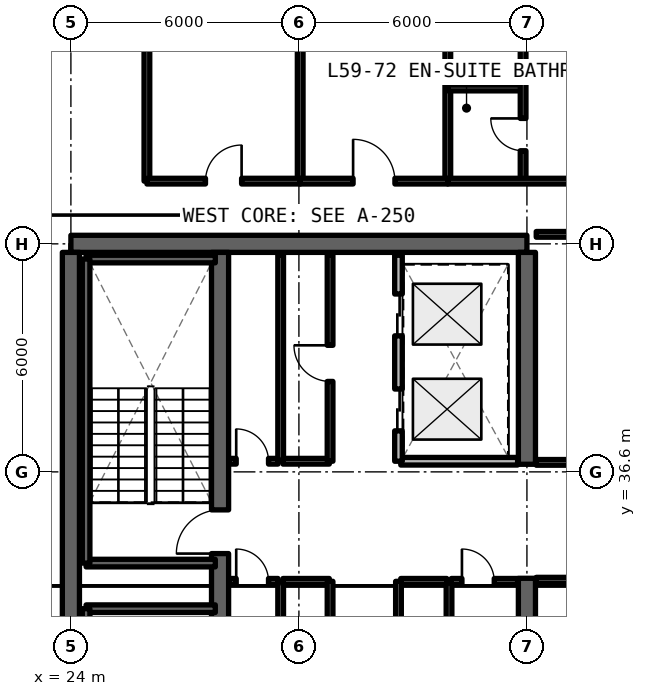
"""IFC4 building model, lengths in metres.
Left out: names, types, materials, properties, quantities, classifications, styles, units other than length and angle.
Written with IfcOpenShell. Run it as: python <this file> out.ifc"""

import sys

from ifc_helpers import new_model, si_unit, direction, frame, frame_2d, origin, place, context, subcontext, project, spatial, rectangle, extrude, element, fill, save


model = new_model("IFC4")
c1 = context("Model", 3, precision=1e-05, world=origin(), true_north=direction((0.0, 1.0)))
c2 = subcontext(c1, "Body", "Model", "MODEL_VIEW")
j1 = project(units=[si_unit("LENGTHUNIT", "METRE"), si_unit("PLANEANGLEUNIT", "RADIAN")], contexts=[c1])
p1 = place(None, origin())
s1 = spatial("IfcSite", under=j1, at=p1, CompositionType="ELEMENT")
p2 = place(p1, origin())
s2 = spatial("IfcBuilding", under=s1, at=p2, CompositionType="ELEMENT")
p3 = place(p2, frame((0.0, 0.0, 211.86)))
s3 = spatial("IfcBuildingStorey", under=s2, at=p3, CompositionType="ELEMENT", Elevation=211.86)
p4 = place(p3, frame((36.0, 42.6, 0.0), z_axis=(0.0, 0.0, 1.0), x_axis=(-1.0, 0.0, 0.0)))
e1 = element("IfcWall", 1, at=p4, inside=s3, PredefinedType="SHEAR", context=c2, shape_type="SweptSolid", body=[
    extrude(rectangle(XDim=12.0, YDim=0.45, at=frame_2d((6.0, 0.0))), origin(), (0.0, 0.0, 1.0), 3.63),
])
p5 = place(p3, frame((24.0, 24.825, 0.0), z_axis=(0.0, 0.0, 1.0), x_axis=(0.0, 1.0, 0.0)))
e2 = element("IfcWall", 2, at=p5, inside=s3, PredefinedType="SHEAR", context=c2, shape_type="SweptSolid", body=[
    extrude(rectangle(XDim=17.55, YDim=0.45, at=frame_2d((8.775, 0.0))), origin(), (0.0, 0.0, 1.0), 3.63),
])
p6 = place(p3, frame((36.0, 24.825, 0.0), z_axis=(0.0, 0.0, 1.0), x_axis=(0.0, 1.0, 0.0)))
e3 = element("IfcWall", 3, at=p6, inside=s3, PredefinedType="SHEAR", context=c2, shape_type="SweptSolid", body=[
    extrude(rectangle(XDim=8.975, YDim=0.45, at=frame_2d((4.488, 0.0))), origin(), (0.0, 0.0, 1.0), 3.63),
])
p7 = place(p3, frame((36.0, 36.8, 0.0), z_axis=(0.0, 0.0, 1.0), x_axis=(0.0, 1.0, 0.0)))
e4 = element("IfcWall", 4, at=p7, inside=s3, PredefinedType="SHEAR", context=c2, shape_type="SweptSolid", body=[
    extrude(rectangle(XDim=5.575, YDim=0.45, at=frame_2d((2.788, 0.0))), origin(), (0.0, 0.0, 1.0), 3.63),
])
p8 = place(p3, frame((27.925, 24.825, 0.0), z_axis=(0.0, 0.0, 1.0), x_axis=(0.0, 1.0, 0.0)))
e5 = element("IfcWall", 5, at=p8, inside=s3, PredefinedType="SHEAR", context=c2, shape_type="SweptSolid", body=[
    extrude(rectangle(XDim=17.55, YDim=0.45, at=frame_2d((8.775, 0.0))), origin(), (0.0, 0.0, 1.0), 3.63),
])
p9 = place(p8, frame((0.425, 0.0, 0.0)))
e6 = element("IfcOpeningElement", 6, at=p9, cuts=e5, PredefinedType="OPENING", context=c2, shape_type="SweptSolid", body=[
    extrude(rectangle(XDim=1.15, YDim=2.15, at=frame_2d((0.575, 1.075))), frame((0.0, 0.235, 0.0), z_axis=(0.0, -1.0, 0.0), x_axis=(1.0, 0.0, 0.0)), (0.0, 0.0, 1.0), 0.47),
])
p10 = place(p8, frame((9.625, 0.0, 0.0)))
e7 = element("IfcOpeningElement", 7, at=p10, cuts=e5, PredefinedType="OPENING", context=c2, shape_type="SweptSolid", body=[
    extrude(rectangle(XDim=1.15, YDim=2.15, at=frame_2d((0.575, 1.075))), frame((0.0, 0.235, 0.0), z_axis=(0.0, -1.0, 0.0), x_axis=(1.0, 0.0, 0.0)), (0.0, 0.0, 1.0), 0.47),
])
p11 = place(p3, frame((29.52, 28.5, 0.0), z_axis=(0.0, 0.0, 1.0), x_axis=(0.0, 1.0, 0.0)))
e8 = element("IfcWall", 8, at=p11, inside=s3, PredefinedType="SOLIDWALL", context=c2, shape_type="SweptSolid", body=[
    extrude(rectangle(XDim=5.22, YDim=0.15, at=frame_2d((2.61, 0.0))), origin(), (0.0, 0.0, 1.0), 2.63),
])
p12 = place(p3, frame((28.17, 33.72, 0.0), z_axis=(0.0, 0.0, 1.0), x_axis=(1.0, 0.0, 0.0)))
e9 = element("IfcWall", 9, at=p12, inside=s3, PredefinedType="SOLIDWALL", context=c2, shape_type="SweptSolid", body=[
    extrude(rectangle(XDim=1.28, YDim=0.15, at=frame_2d((0.64, 0.0))), origin(), (0.0, 0.0, 1.0), 2.63),
])
p13 = place(p12, frame((0.18, 0.0, 0.0)))
e10 = element("IfcOpeningElement", 10, at=p13, cuts=e9, PredefinedType="OPENING", context=c2, shape_type="SweptSolid", body=[
    extrude(rectangle(XDim=0.85, YDim=2.1, at=frame_2d((0.425, 1.05))), frame((0.0, 0.085, 0.0), z_axis=(0.0, -1.0, 0.0), x_axis=(1.0, 0.0, 0.0)), (0.0, 0.0, 1.0), 0.17),
])
p14 = place(p3, frame((29.58, 33.72, 0.0), z_axis=(0.0, 0.0, 1.0), x_axis=(1.0, 0.0, 0.0)))
e11 = element("IfcWall", 11, at=p14, inside=s3, PredefinedType="SOLIDWALL", context=c2, shape_type="SweptSolid", body=[
    extrude(rectangle(XDim=1.22, YDim=0.15, at=frame_2d((0.61, 0.0))), origin(), (0.0, 0.0, 1.0), 2.63),
])
p15 = place(p3, frame((30.82, 28.5, 0.0), z_axis=(0.0, 0.0, 1.0), x_axis=(0.0, 1.0, 0.0)))
e12 = element("IfcWall", 12, at=p15, inside=s3, PredefinedType="SOLIDWALL", context=c2, shape_type="SweptSolid", body=[
    extrude(rectangle(XDim=5.22, YDim=0.15, at=frame_2d((2.61, 0.0))), origin(), (0.0, 0.0, 1.0), 2.63),
])
p16 = place(p15, frame((2.0, 0.0, 0.0)))
e13 = element("IfcOpeningElement", 13, at=p16, cuts=e12, PredefinedType="OPENING", context=c2, shape_type="SweptSolid", body=[
    extrude(rectangle(XDim=0.95, YDim=2.15, at=frame_2d((0.475, 1.075))), frame((0.0, 0.085, 0.0), z_axis=(0.0, -1.0, 0.0), x_axis=(1.0, 0.0, 0.0)), (0.0, 0.0, 1.0), 0.17),
])
p17 = place(p3, frame((33.95, 28.5, 0.0), z_axis=(0.0, 0.0, 1.0), x_axis=(0.0, 1.0, 0.0)))
e14 = element("IfcWall", 14, at=p17, inside=s3, PredefinedType="SOLIDWALL", context=c2, shape_type="SweptSolid", body=[
    extrude(rectangle(XDim=5.22, YDim=0.15, at=frame_2d((2.61, 0.0))), origin(), (0.0, 0.0, 1.0), 2.63),
])
p18 = place(p3, frame((32.68, 33.72, 0.0), z_axis=(0.0, 0.0, 1.0), x_axis=(1.0, 0.0, 0.0)))
e15 = element("IfcWall", 15, at=p18, inside=s3, PredefinedType="SOLIDWALL", context=c2, shape_type="SweptSolid", body=[
    extrude(rectangle(XDim=1.21, YDim=0.15, at=frame_2d((0.605, 0.0))), origin(), (0.0, 0.0, 1.0), 2.63),
])
p19 = place(p3, frame((34.01, 33.72, 0.0), z_axis=(0.0, 0.0, 1.0), x_axis=(1.0, 0.0, 0.0)))
e16 = element("IfcWall", 16, at=p19, inside=s3, PredefinedType="SOLIDWALL", context=c2, shape_type="SweptSolid", body=[
    extrude(rectangle(XDim=1.745, YDim=0.15, at=frame_2d((0.873, 0.0))), origin(), (0.0, 0.0, 1.0), 2.63),
])
p20 = place(p19, frame((0.28, 0.0, 0.0)))
e17 = element("IfcOpeningElement", 17, at=p20, cuts=e16, PredefinedType="OPENING", context=c2, shape_type="SweptSolid", body=[
    extrude(rectangle(XDim=0.85, YDim=2.1, at=frame_2d((0.425, 1.05))), frame((0.0, 0.085, 0.0), z_axis=(0.0, -1.0, 0.0), x_axis=(1.0, 0.0, 0.0)), (0.0, 0.0, 1.0), 0.17),
])
p21 = place(p3, frame((32.62, 28.5, 0.0), z_axis=(0.0, 0.0, 1.0), x_axis=(0.0, 1.0, 0.0)))
e18 = element("IfcWall", 18, at=p21, inside=s3, PredefinedType="SOLIDWALL", context=c2, shape_type="SweptSolid", body=[
    extrude(rectangle(XDim=5.22, YDim=0.15, at=frame_2d((2.61, 0.0))), origin(), (0.0, 0.0, 1.0), 2.63),
])
p22 = place(p21, frame((2.0, 0.0, 0.0)))
e19 = element("IfcOpeningElement", 19, at=p22, cuts=e18, PredefinedType="OPENING", context=c2, shape_type="SweptSolid", body=[
    extrude(rectangle(XDim=0.95, YDim=2.15, at=frame_2d((0.475, 1.075))), frame((0.0, 0.085, 0.0), z_axis=(0.0, -1.0, 0.0), x_axis=(1.0, 0.0, 0.0)), (0.0, 0.0, 1.0), 0.17),
])
p23 = place(p3, frame((29.52, 36.88, 0.0), z_axis=(0.0, 0.0, 1.0), x_axis=(0.0, 1.0, 0.0)))
e20 = element("IfcWall", 20, at=p23, inside=s3, PredefinedType="SOLIDWALL", context=c2, shape_type="SweptSolid", body=[
    extrude(rectangle(XDim=5.42, YDim=0.15, at=frame_2d((2.71, 0.0))), origin(), (0.0, 0.0, 1.0), 2.63),
])
p24 = place(p3, frame((28.17, 36.88, 0.0), z_axis=(0.0, 0.0, 1.0), x_axis=(1.0, 0.0, 0.0)))
e21 = element("IfcWall", 21, at=p24, inside=s3, PredefinedType="SOLIDWALL", context=c2, shape_type="SweptSolid", body=[
    extrude(rectangle(XDim=1.28, YDim=0.15, at=frame_2d((0.64, 0.0))), origin(), (0.0, 0.0, 1.0), 2.63),
])
p25 = place(p24, frame((0.18, 0.0, 0.0)))
e22 = element("IfcOpeningElement", 22, at=p25, cuts=e21, PredefinedType="OPENING", context=c2, shape_type="SweptSolid", body=[
    extrude(rectangle(XDim=0.85, YDim=2.1, at=frame_2d((0.425, 1.05))), frame((0.0, 0.085, 0.0), z_axis=(0.0, -1.0, 0.0), x_axis=(1.0, 0.0, 0.0)), (0.0, 0.0, 1.0), 0.17),
])
p26 = place(p3, frame((29.58, 36.88, 0.0), z_axis=(0.0, 0.0, 1.0), x_axis=(1.0, 0.0, 0.0)))
e23 = element("IfcWall", 23, at=p26, inside=s3, PredefinedType="SOLIDWALL", context=c2, shape_type="SweptSolid", body=[
    extrude(rectangle(XDim=1.22, YDim=0.15, at=frame_2d((0.61, 0.0))), origin(), (0.0, 0.0, 1.0), 2.63),
])
p27 = place(p3, frame((30.82, 36.88, 0.0), z_axis=(0.0, 0.0, 1.0), x_axis=(0.0, 1.0, 0.0)))
e24 = element("IfcWall", 24, at=p27, inside=s3, PredefinedType="SOLIDWALL", context=c2, shape_type="SweptSolid", body=[
    extrude(rectangle(XDim=5.42, YDim=0.15, at=frame_2d((2.71, 0.0))), origin(), (0.0, 0.0, 1.0), 2.63),
])
p28 = place(p27, frame((2.1, 0.0, 0.0)))
e25 = element("IfcOpeningElement", 25, at=p28, cuts=e24, PredefinedType="OPENING", context=c2, shape_type="SweptSolid", body=[
    extrude(rectangle(XDim=0.95, YDim=2.15, at=frame_2d((0.475, 1.075))), frame((0.0, 0.085, 0.0), z_axis=(0.0, -1.0, 0.0), x_axis=(1.0, 0.0, 0.0)), (0.0, 0.0, 1.0), 0.17),
])
p29 = place(p3, frame((32.68, 36.88, 0.0), z_axis=(0.0, 0.0, 1.0), x_axis=(1.0, 0.0, 0.0)))
e26 = element("IfcWall", 26, at=p29, inside=s3, PredefinedType="SOLIDWALL", context=c2, shape_type="SweptSolid", body=[
    extrude(rectangle(XDim=3.075, YDim=0.2, at=frame_2d((1.538, 0.0))), origin(), (0.0, 0.0, 1.0), 2.63),
])
p30 = place(p3, frame((32.62, 36.88, 0.0), z_axis=(0.0, 0.0, 1.0), x_axis=(0.0, 1.0, 0.0)))
e27 = element("IfcWall", 27, at=p30, inside=s3, PredefinedType="SOLIDWALL", context=c2, shape_type="SweptSolid", body=[
    extrude(rectangle(XDim=5.42, YDim=0.2, at=frame_2d((2.71, 0.0))), origin(), (0.0, 0.0, 1.0), 2.63),
])
p31 = place(p30, frame((0.8, 0.0, 0.0)))
e28 = element("IfcOpeningElement", 28, at=p31, cuts=e27, PredefinedType="OPENING", context=c2, shape_type="SweptSolid", body=[
    extrude(rectangle(XDim=1.1, YDim=2.2, at=frame_2d((0.55, 1.1))), frame((0.0, 0.11, 0.0), z_axis=(0.0, -1.0, 0.0), x_axis=(1.0, 0.0, 0.0)), (0.0, 0.0, 1.0), 0.22),
])
p32 = place(p30, frame((3.3, 0.0, 0.0)))
e29 = element("IfcOpeningElement", 29, at=p32, cuts=e27, PredefinedType="OPENING", context=c2, shape_type="SweptSolid", body=[
    extrude(rectangle(XDim=1.1, YDim=2.2, at=frame_2d((0.55, 1.1))), frame((0.0, 0.11, 0.0), z_axis=(0.0, -1.0, 0.0), x_axis=(1.0, 0.0, 0.0)), (0.0, 0.0, 1.0), 0.22),
])
p33 = place(p3, frame((36.245, 33.75, 0.0), z_axis=(0.0, 0.0, 1.0), x_axis=(1.0, 0.0, 0.0)))
e30 = element("IfcWall", 30, at=p33, inside=s3, PredefinedType="SOLIDWALL", context=c2, shape_type="SweptSolid", body=[
    extrude(rectangle(XDim=7.905, YDim=0.15, at=frame_2d((3.952, 0.0))), origin(), (0.0, 0.0, 1.0), 2.63),
])
p34 = place(p33, frame((3.478, 0.0, 0.0)))
e31 = element("IfcOpeningElement", 31, at=p34, cuts=e30, PredefinedType="OPENING", context=c2, shape_type="SweptSolid", body=[
    extrude(rectangle(XDim=0.95, YDim=2.15, at=frame_2d((0.475, 1.075))), frame((0.0, 0.085, 0.0), z_axis=(0.0, -1.0, 0.0), x_axis=(1.0, 0.0, 0.0)), (0.0, 0.0, 1.0), 0.17),
])
p35 = place(p3, frame((36.245, 36.85, 0.0), z_axis=(0.0, 0.0, 1.0), x_axis=(1.0, 0.0, 0.0)))
e32 = element("IfcWall", 32, at=p35, inside=s3, PredefinedType="SOLIDWALL", context=c2, shape_type="SweptSolid", body=[
    extrude(rectangle(XDim=7.905, YDim=0.15, at=frame_2d((3.952, 0.0))), origin(), (0.0, 0.0, 1.0), 2.63),
])
p36 = place(p35, frame((3.478, 0.0, 0.0)))
e33 = element("IfcOpeningElement", 33, at=p36, cuts=e32, PredefinedType="OPENING", context=c2, shape_type="SweptSolid", body=[
    extrude(rectangle(XDim=0.95, YDim=2.15, at=frame_2d((0.475, 1.075))), frame((0.0, 0.085, 0.0), z_axis=(0.0, -1.0, 0.0), x_axis=(1.0, 0.0, 0.0)), (0.0, 0.0, 1.0), 0.17),
])
p37 = place(p3, frame((36.245, 42.85, 0.0), z_axis=(0.0, 0.0, 1.0), x_axis=(1.0, 0.0, 0.0)))
e34 = element("IfcWall", 34, at=p37, inside=s3, PredefinedType="SOLIDWALL", context=c2, shape_type="SweptSolid", body=[
    extrude(rectangle(XDim=7.905, YDim=0.15, at=frame_2d((3.952, 0.0))), origin(), (0.0, 0.0, 1.0), 2.63),
])
p38 = place(p3, frame((26.0, 44.25, 0.0), z_axis=(0.0, 0.0, 1.0), x_axis=(0.0, 1.0, 0.0)))
e35 = element("IfcWall", 35, at=p38, inside=s3, PredefinedType="SOLIDWALL", context=c2, shape_type="SweptSolid", body=[
    extrude(rectangle(XDim=10.79, YDim=0.15, at=frame_2d((5.395, 0.0))), origin(), (0.0, 0.0, 1.0), 2.63),
])
p39 = place(p3, frame((30.034, 44.25, 0.0), z_axis=(0.0, 0.0, 1.0), x_axis=(0.0, 1.0, 0.0)))
e36 = element("IfcWall", 36, at=p39, inside=s3, PredefinedType="SOLIDWALL", context=c2, shape_type="SweptSolid", body=[
    extrude(rectangle(XDim=8.084, YDim=0.15, at=frame_2d((4.042, 0.0))), origin(), (0.0, 0.0, 1.0), 2.63),
])
p40 = place(p3, frame((26.0, 44.25, 0.0), z_axis=(0.0, 0.0, 1.0), x_axis=(1.0, 0.0, 0.0)))
e37 = element("IfcWall", 37, at=p40, inside=s3, PredefinedType="SOLIDWALL", context=c2, shape_type="SweptSolid", body=[
    extrude(rectangle(XDim=4.034, YDim=0.15, at=frame_2d((2.017, 0.0))), origin(), (0.0, 0.0, 1.0), 2.63),
])
p41 = place(p40, frame((1.542, 0.0, 0.0)))
e38 = element("IfcOpeningElement", 38, at=p41, cuts=e37, PredefinedType="OPENING", context=c2, shape_type="SweptSolid", body=[
    extrude(rectangle(XDim=0.95, YDim=2.15, at=frame_2d((0.475, 1.075))), frame((0.0, 0.085, 0.0), z_axis=(0.0, -1.0, 0.0), x_axis=(1.0, 0.0, 0.0)), (0.0, 0.0, 1.0), 0.17),
])
p42 = place(p3, frame((33.918, 44.25, 0.0), z_axis=(0.0, 0.0, 1.0), x_axis=(0.0, 1.0, 0.0)))
e39 = element("IfcWall", 39, at=p42, inside=s3, PredefinedType="SOLIDWALL", context=c2, shape_type="SweptSolid", body=[
    extrude(rectangle(XDim=8.214, YDim=0.15, at=frame_2d((4.107, 0.0))), origin(), (0.0, 0.0, 1.0), 2.63),
])
p43 = place(p3, frame((30.034, 44.25, 0.0), z_axis=(0.0, 0.0, 1.0), x_axis=(1.0, 0.0, 0.0)))
e40 = element("IfcWall", 40, at=p43, inside=s3, PredefinedType="SOLIDWALL", context=c2, shape_type="SweptSolid", body=[
    extrude(rectangle(XDim=3.885, YDim=0.15, at=frame_2d((1.942, 0.0))), origin(), (0.0, 0.0, 1.0), 2.63),
])
p44 = place(p43, frame((1.392, 0.0, 0.0)))
e41 = element("IfcOpeningElement", 41, at=p44, cuts=e40, PredefinedType="OPENING", context=c2, shape_type="SweptSolid", body=[
    extrude(rectangle(XDim=1.1, YDim=2.15, at=frame_2d((0.55, 1.075))), frame((0.0, 0.085, 0.0), z_axis=(0.0, -1.0, 0.0), x_axis=(1.0, 0.0, 0.0)), (0.0, 0.0, 1.0), 0.17),
])
p45 = place(p3, frame((33.918, 46.7, 0.0), z_axis=(0.0, 0.0, 1.0), x_axis=(1.0, 0.0, 0.0)))
e42 = element("IfcWall", 42, at=p45, inside=s3, PredefinedType="PARTITIONING", context=c2, shape_type="SweptSolid", body=[
    extrude(rectangle(XDim=1.981, YDim=0.15, at=frame_2d((0.991, 0.0))), origin(), (0.0, 0.0, 1.0), 2.63),
])
p46 = place(p3, frame((35.899, 44.25, 0.0), z_axis=(0.0, 0.0, 1.0), x_axis=(0.0, 1.0, 0.0)))
e43 = element("IfcWall", 43, at=p46, inside=s3, PredefinedType="PARTITIONING", context=c2, shape_type="SweptSolid", body=[
    extrude(rectangle(XDim=8.458, YDim=0.15, at=frame_2d((4.229, 0.0))), origin(), (0.0, 0.0, 1.0), 2.63),
])
p47 = place(p46, frame((0.8, 0.0, 0.0)))
e44 = element("IfcOpeningElement", 44, at=p47, cuts=e43, PredefinedType="OPENING", context=c2, shape_type="SweptSolid", body=[
    extrude(rectangle(XDim=0.85, YDim=2.1, at=frame_2d((0.425, 1.05))), frame((0.0, 0.085, 0.0), z_axis=(0.0, -1.0, 0.0), x_axis=(1.0, 0.0, 0.0)), (0.0, 0.0, 1.0), 0.17),
])
p48 = place(p46, frame((4.23, 0.0, 0.0)))
e45 = element("IfcOpeningElement", 45, at=p48, cuts=e43, PredefinedType="OPENING", context=c2, shape_type="SweptSolid", body=[
    extrude(rectangle(XDim=0.85, YDim=2.1, at=frame_2d((0.425, 1.05))), frame((0.0, 0.085, 0.0), z_axis=(0.0, -1.0, 0.0), x_axis=(1.0, 0.0, 0.0)), (0.0, 0.0, 1.0), 0.17),
])
p49 = place(p3, frame((33.918, 44.25, 0.0), z_axis=(0.0, 0.0, 1.0), x_axis=(1.0, 0.0, 0.0)))
e46 = element("IfcWall", 46, at=p49, inside=s3, PredefinedType="SOLIDWALL", context=c2, shape_type="SweptSolid", body=[
    extrude(rectangle(XDim=5.827, YDim=0.15, at=frame_2d((2.913, 0.0))), origin(), (0.0, 0.0, 1.0), 2.63),
])
p50 = place(p49, frame((3.469, 0.0, 0.0)))
e47 = element("IfcOpeningElement", 47, at=p50, cuts=e46, PredefinedType="OPENING", context=c2, shape_type="SweptSolid", body=[
    extrude(rectangle(XDim=0.95, YDim=2.15, at=frame_2d((0.475, 1.075))), frame((0.0, 0.085, 0.0), z_axis=(0.0, -1.0, 0.0), x_axis=(1.0, 0.0, 0.0)), (0.0, 0.0, 1.0), 0.17),
])
p51 = place(p3, frame((27.8, 33.0, 0.0), z_axis=(0.0, 0.0, 1.0), x_axis=(-1.0, 0.0, 0.0)))
e48 = element("IfcWall", 48, at=p51, inside=s3, PredefinedType="SOLIDWALL", context=c2, shape_type="SweptSolid", body=[
    extrude(rectangle(XDim=3.4, YDim=0.2, at=frame_2d((1.7, 0.0))), origin(), (0.0, 0.0, 1.0), 3.63),
])
p52 = place(p3, frame((24.4, 33.0, 0.0), z_axis=(0.0, 0.0, 1.0), x_axis=(0.0, -1.0, 0.0)))
e49 = element("IfcWall", 49, at=p52, inside=s3, PredefinedType="SOLIDWALL", context=c2, shape_type="SweptSolid", body=[
    extrude(rectangle(XDim=8.0, YDim=0.2, at=frame_2d((4.0, 0.0))), origin(), (0.0, 0.0, 1.0), 3.63),
])
for number, where, z_axis, x_axis in (
    (50, (24.4, 34.2, 0.0), (0.0, 0.0, 1.0), (1.0, 0.0, 0.0)),
    (51, (27.8, 42.2, 0.0), (0.0, 0.0, 1.0), (-1.0, 0.0, 0.0)),
):
    element("IfcWall", number, at=place(p3, frame(where, z_axis=z_axis, x_axis=x_axis)), inside=s3, PredefinedType="SOLIDWALL", context=c2, shape_type="SweptSolid", body=[
        extrude(rectangle(XDim=3.4, YDim=0.2, at=frame_2d((1.7, 0.0))), origin(), (0.0, 0.0, 1.0), 3.63),
    ])
p53 = place(p3, frame((24.4, 42.2, 0.0), z_axis=(0.0, 0.0, 1.0), x_axis=(0.0, -1.0, 0.0)))
e52 = element("IfcWall", 52, at=p53, inside=s3, PredefinedType="SOLIDWALL", context=c2, shape_type="SweptSolid", body=[
    extrude(rectangle(XDim=8.0, YDim=0.2, at=frame_2d((4.0, 0.0))), origin(), (0.0, 0.0, 1.0), 3.63),
])
p54 = place(p13, origin())
e53 = element("IfcDoor", 53, at=p54, inside=s3, OperationType="SINGLE_SWING_LEFT", PredefinedType="DOOR", context=c2, shape_type="SweptSolid", body=[
    extrude(rectangle(XDim=0.85, YDim=2.1, at=frame_2d((0.425, 1.05))), frame((0.0, 0.025, 0.0), z_axis=(0.0, -1.0, 0.0), x_axis=(1.0, 0.0, 0.0)), (0.0, 0.0, 1.0), 0.05),
])
fill(e10, e53)
p55 = place(p20, origin())
e54 = element("IfcDoor", 54, at=p55, inside=s3, OperationType="SINGLE_SWING_LEFT", PredefinedType="DOOR", context=c2, shape_type="SweptSolid", body=[
    extrude(rectangle(XDim=0.85, YDim=2.1, at=frame_2d((0.425, 1.05))), frame((0.0, 0.025, 0.0), z_axis=(0.0, -1.0, 0.0), x_axis=(1.0, 0.0, 0.0)), (0.0, 0.0, 1.0), 0.05),
])
fill(e17, e54)
p56 = place(p25, origin())
e55 = element("IfcDoor", 55, at=p56, inside=s3, OperationType="SINGLE_SWING_LEFT", PredefinedType="DOOR", context=c2, shape_type="SweptSolid", body=[
    extrude(rectangle(XDim=0.85, YDim=2.1, at=frame_2d((0.425, 1.05))), frame((0.0, 0.025, 0.0), z_axis=(0.0, -1.0, 0.0), x_axis=(1.0, 0.0, 0.0)), (0.0, 0.0, 1.0), 0.05),
])
fill(e22, e55)
p57 = place(p28, origin())
e56 = element("IfcDoor", 56, at=p57, inside=s3, OperationType="SINGLE_SWING_RIGHT", PredefinedType="DOOR", context=c2, shape_type="SweptSolid", body=[
    extrude(rectangle(XDim=0.95, YDim=2.15, at=frame_2d((0.475, 1.075))), frame((0.0, 0.025, 0.0), z_axis=(0.0, -1.0, 0.0), x_axis=(1.0, 0.0, 0.0)), (0.0, 0.0, 1.0), 0.05),
])
fill(e25, e56)
p58 = place(p31, origin())
e57 = element("IfcDoor", 57, at=p58, inside=s3, OperationType="SLIDING_TO_LEFT", PredefinedType="DOOR", context=c2, shape_type="SweptSolid", body=[
    extrude(rectangle(XDim=1.1, YDim=2.2, at=frame_2d((0.55, 1.1))), frame((0.0, 0.025, 0.0), z_axis=(0.0, -1.0, 0.0), x_axis=(1.0, 0.0, 0.0)), (0.0, 0.0, 1.0), 0.05),
])
fill(e28, e57)
p59 = place(p32, origin())
e58 = element("IfcDoor", 58, at=p59, inside=s3, OperationType="SLIDING_TO_RIGHT", PredefinedType="DOOR", context=c2, shape_type="SweptSolid", body=[
    extrude(rectangle(XDim=1.1, YDim=2.2, at=frame_2d((0.55, 1.1))), frame((0.0, 0.025, 0.0), z_axis=(0.0, -1.0, 0.0), x_axis=(1.0, 0.0, 0.0)), (0.0, 0.0, 1.0), 0.05),
])
fill(e29, e58)
p60 = place(p41, origin())
e59 = element("IfcDoor", 59, at=p60, inside=s3, OperationType="SINGLE_SWING_RIGHT", PredefinedType="DOOR", context=c2, shape_type="SweptSolid", body=[
    extrude(rectangle(XDim=0.95, YDim=2.15, at=frame_2d((0.475, 1.075))), frame((0.0, 0.025, 0.0), z_axis=(0.0, -1.0, 0.0), x_axis=(1.0, 0.0, 0.0)), (0.0, 0.0, 1.0), 0.05),
])
fill(e38, e59)
p61 = place(p44, origin())
e60 = element("IfcDoor", 60, at=p61, inside=s3, OperationType="SINGLE_SWING_LEFT", PredefinedType="DOOR", context=c2, shape_type="SweptSolid", body=[
    extrude(rectangle(XDim=1.1, YDim=2.15, at=frame_2d((0.55, 1.075))), frame((0.0, 0.025, 0.0), z_axis=(0.0, -1.0, 0.0), x_axis=(1.0, 0.0, 0.0)), (0.0, 0.0, 1.0), 0.05),
])
fill(e41, e60)
p62 = place(p47, origin())
e61 = element("IfcDoor", 61, at=p62, inside=s3, OperationType="SINGLE_SWING_RIGHT", PredefinedType="DOOR", context=c2, shape_type="SweptSolid", body=[
    extrude(rectangle(XDim=0.85, YDim=2.1, at=frame_2d((0.425, 1.05))), frame((0.0, 0.025, 0.0), z_axis=(0.0, -1.0, 0.0), x_axis=(1.0, 0.0, 0.0)), (0.0, 0.0, 1.0), 0.05),
])
fill(e44, e61)
p63 = place(p10, origin())
e62 = element("IfcDoor", 62, at=p63, inside=s3, OperationType="SINGLE_SWING_LEFT", PredefinedType="DOOR", context=c2, shape_type="SweptSolid", body=[
    extrude(rectangle(XDim=1.15, YDim=2.15, at=frame_2d((0.575, 1.075))), frame((0.0, 0.025, 0.0), z_axis=(0.0, -1.0, 0.0), x_axis=(1.0, 0.0, 0.0)), (0.0, 0.0, 1.0), 0.05),
])
fill(e7, e62)
save(model, sys.argv[1])
